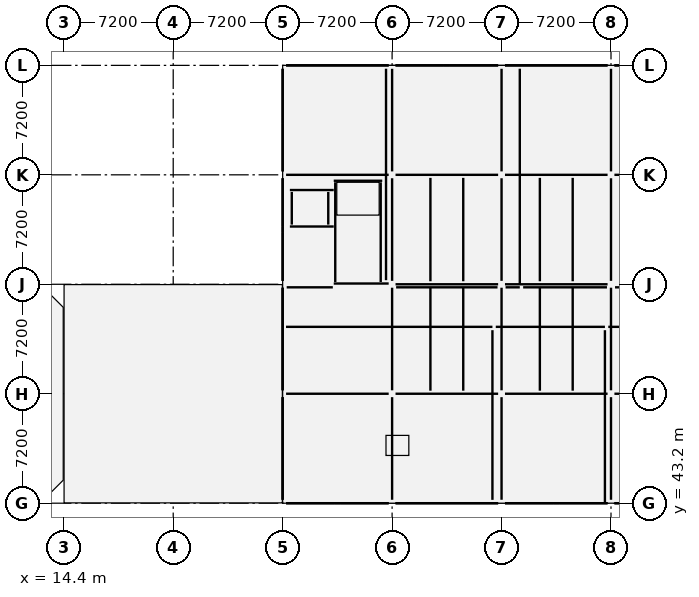
"""IFC4 building model, lengths in metres.
Left out: names, types, materials, properties, quantities, classifications, styles, units other than length and angle.
Written with IfcOpenShell. Run it as: python <this file> out.ifc"""

import sys

from ifc_helpers import new_model, si_unit, direction, frame, frame_2d, origin, origin_2d, place, context, subcontext, project, spatial, rectangle, extrude, element, fill, save


model = new_model("IFC4")
c1 = context("Model", 3, precision=1e-05, world=origin(), true_north=direction((0.0, 1.0)))
c2 = subcontext(c1, "Body", "Model", "MODEL_VIEW")
j1 = project(units=[si_unit("LENGTHUNIT", "METRE"), si_unit("PLANEANGLEUNIT", "RADIAN")], contexts=[c1])
p1 = place(None, origin())
s1 = spatial("IfcSite", under=j1, at=p1, CompositionType="ELEMENT")
p2 = place(p1, origin())
s2 = spatial("IfcBuilding", under=s1, at=p2, CompositionType="ELEMENT")
p3 = place(p2, frame((0.0, 0.0, 5.4)))
s3 = spatial("IfcBuildingStorey", under=s2, at=p3, CompositionType="ELEMENT", Elevation=5.4)
for number, where, z_axis, x_axis in (
    (1, (28.8, 43.2, 0.0), (0.0, 0.0, 1.0), (1.0, 0.0, 0.0)),
    (2, (28.8, 50.4, 0.0), (0.0, 0.0, 1.0), (1.0, 0.0, 0.0)),
    (3, (28.8, 57.6, 0.0), (0.0, 0.0, 1.0), (1.0, 0.0, 0.0)),
    (4, (28.8, 64.8, 0.0), (0.0, 0.0, 1.0), (1.0, 0.0, 0.0)),
    (5, (28.8, 72.0, 0.0), (0.0, 0.0, 1.0), (1.0, 0.0, 0.0)),
    (6, (36.0, 43.2, 0.0), (0.0, 0.0, 1.0), (1.0, 0.0, 0.0)),
    (7, (36.0, 50.4, 0.0), (0.0, 0.0, 1.0), (1.0, 0.0, 0.0)),
    (8, (36.0, 57.6, 0.0), (0.0, 0.0, 1.0), (1.0, 0.0, 0.0)),
    (9, (36.0, 64.8, 0.0), (0.0, 0.0, 1.0), (1.0, 0.0, 0.0)),
    (10, (36.0, 72.0, 0.0), (0.0, 0.0, 1.0), (1.0, 0.0, 0.0)),
    (11, (43.2, 43.2, 0.0), (0.0, 0.0, 1.0), (1.0, 0.0, 0.0)),
    (12, (43.2, 50.4, 0.0), (0.0, 0.0, 1.0), (1.0, 0.0, 0.0)),
    (13, (43.2, 57.6, 0.0), (0.0, 0.0, 1.0), (1.0, 0.0, 0.0)),
    (14, (43.2, 64.8, 0.0), (0.0, 0.0, 1.0), (1.0, 0.0, 0.0)),
    (15, (43.2, 72.0, 0.0), (0.0, 0.0, 1.0), (1.0, 0.0, 0.0)),
    (16, (50.4, 43.2, 0.0), (0.0, 0.0, 1.0), (1.0, 0.0, 0.0)),
    (17, (50.4, 50.4, 0.0), (0.0, 0.0, 1.0), (1.0, 0.0, 0.0)),
    (18, (50.4, 57.6, 0.0), (0.0, 0.0, 1.0), (1.0, 0.0, 0.0)),
    (19, (50.4, 64.8, 0.0), (0.0, 0.0, 1.0), (1.0, 0.0, 0.0)),
    (20, (50.4, 72.0, 0.0), (0.0, 0.0, 1.0), (1.0, 0.0, 0.0)),
):
    element("IfcColumn", number, at=place(p3, frame(where, z_axis=z_axis, x_axis=x_axis)), inside=s3, PredefinedType="COLUMN", context=c2, shape_type="SweptSolid", body=[
        extrude(rectangle(XDim=0.45, YDim=0.45, at=origin_2d()), origin(), (0.0, 0.0, 1.0), 4.2),
    ])
p4 = place(p3, frame((29.275, 61.4, 0.0), z_axis=(0.0, 0.0, 1.0), x_axis=(1.0, 0.0, 0.0)))
e21 = element("IfcWall", 21, at=p4, inside=s3, PredefinedType="SHEAR", context=c2, shape_type="SweptSolid", body=[
    extrude(rectangle(XDim=2.885, YDim=0.25, at=frame_2d((1.442, 0.0))), origin(), (0.0, 0.0, 1.0), 3.95),
])
p5 = place(p4, frame((0.942, 0.0, 0.0)))
e22 = element("IfcOpeningElement", 22, at=p5, cuts=e21, PredefinedType="OPENING", context=c2, shape_type="SweptSolid", body=[
    extrude(rectangle(XDim=1.0, YDim=2.1, at=frame_2d((0.5, 1.05))), frame((0.0, 0.137, 0.0), z_axis=(0.0, -1.0, 0.0), x_axis=(1.0, 0.0, 0.0)), (0.0, 0.0, 1.0), 0.274),
])
p6 = place(p3, frame((29.275, 63.8, 0.0), z_axis=(0.0, 0.0, 1.0), x_axis=(1.0, 0.0, 0.0)))
e23 = element("IfcWall", 23, at=p6, inside=s3, PredefinedType="SHEAR", context=c2, shape_type="SweptSolid", body=[
    extrude(rectangle(XDim=2.885, YDim=0.25, at=frame_2d((1.442, 0.0))), origin(), (0.0, 0.0, 1.0), 3.95),
])
for number, where, z_axis, x_axis in (
    (24, (29.4, 61.525, 0.0), (0.0, 0.0, 1.0), (0.0, 1.0, 0.0)),
    (25, (31.8, 61.525, 0.0), (0.0, 0.0, 1.0), (0.0, 1.0, 0.0)),
):
    element("IfcWall", number, at=place(p3, frame(where, z_axis=z_axis, x_axis=x_axis)), inside=s3, PredefinedType="SHEAR", context=c2, shape_type="SweptSolid", body=[
        extrude(rectangle(XDim=2.15, YDim=0.25, at=frame_2d((1.075, 0.0))), origin(), (0.0, 0.0, 1.0), 3.95),
    ])
p7 = place(p3, frame((32.16, 57.65, 0.0), z_axis=(0.0, 0.0, 1.0), x_axis=(1.0, 0.0, 0.0)))
e26 = element("IfcWall", 26, at=p7, inside=s3, PredefinedType="SHEAR", context=c2, shape_type="SweptSolid", body=[
    extrude(rectangle(XDim=3.615, YDim=0.2, at=frame_2d((1.808, 0.0))), origin(), (0.0, 0.0, 1.0), 3.95),
])
p8 = place(p7, frame((1.258, 0.0, 0.0)))
e27 = element("IfcOpeningElement", 27, at=p8, cuts=e26, PredefinedType="OPENING", context=c2, shape_type="SweptSolid", body=[
    extrude(rectangle(XDim=1.1, YDim=2.15, at=frame_2d((0.55, 1.075))), frame((0.0, 0.112, 0.0), z_axis=(0.0, -1.0, 0.0), x_axis=(1.0, 0.0, 0.0)), (0.0, 0.0, 1.0), 0.224),
])
p9 = place(p3, frame((32.16, 64.41, 0.0), z_axis=(0.0, 0.0, 1.0), x_axis=(1.0, 0.0, 0.0)))
e28 = element("IfcWall", 28, at=p9, inside=s3, PredefinedType="SHEAR", context=c2, shape_type="SweptSolid", body=[
    extrude(rectangle(XDim=3.19, YDim=0.2, at=frame_2d((1.595, 0.0))), origin(), (0.0, 0.0, 1.0), 3.95),
])
for number, where, z_axis, x_axis in (
    (29, (32.26, 57.75, 0.0), (0.0, 0.0, 1.0), (0.0, 1.0, 0.0)),
    (30, (35.25, 57.75, 0.0), (0.0, 0.0, 1.0), (0.0, 1.0, 0.0)),
):
    element("IfcWall", number, at=place(p3, frame(where, z_axis=z_axis, x_axis=x_axis)), inside=s3, PredefinedType="SHEAR", context=c2, shape_type="SweptSolid", body=[
        extrude(rectangle(XDim=6.56, YDim=0.2, at=frame_2d((3.28, 0.0))), origin(), (0.0, 0.0, 1.0), 3.95),
    ])
p10 = place(p3, frame((50.175, 72.0, 0.0), z_axis=(0.0, 0.0, 1.0), x_axis=(-1.0, 0.0, 0.0)))
e31 = element("IfcWall", 31, at=p10, inside=s3, PredefinedType="ELEMENTEDWALL", context=c2, shape_type="SweptSolid", body=[
    extrude(rectangle(XDim=6.75, YDim=0.32, at=frame_2d((3.375, 0.0))), origin(), (0.0, 0.0, 1.0), 3.29),
])
p11 = place(p10, frame((2.775, 0.0, 0.85)))
e32 = element("IfcOpeningElement", 32, at=p11, cuts=e31, PredefinedType="OPENING", context=c2, shape_type="SweptSolid", body=[
    extrude(rectangle(XDim=1.2, YDim=2.2, at=frame_2d((0.6, 1.1))), frame((0.0, 0.172, 0.0), z_axis=(0.0, -1.0, 0.0), x_axis=(1.0, 0.0, 0.0)), (0.0, 0.0, 1.0), 0.344),
])
p12 = place(p3, frame((39.8, 72.0, 0.0), z_axis=(0.0, 0.0, 1.0), x_axis=(-1.0, 0.0, 0.0)))
e33 = element("IfcWall", 33, at=p12, inside=s3, PredefinedType="SOLIDWALL", context=c2, shape_type="SweptSolid", body=[
    extrude(rectangle(XDim=0.4, YDim=0.36, at=frame_2d((0.2, 0.0))), origin(), (0.0, 0.0, 1.0), 3.29),
])
p13 = place(p3, frame((35.775, 72.0, 0.0), z_axis=(0.0, 0.0, 1.0), x_axis=(-1.0, 0.0, 0.0)))
e34 = element("IfcWall", 34, at=p13, inside=s3, PredefinedType="ELEMENTEDWALL", context=c2, shape_type="SweptSolid", body=[
    extrude(rectangle(XDim=6.75, YDim=0.32, at=frame_2d((3.375, 0.0))), origin(), (0.0, 0.0, 1.0), 3.29),
])
p14 = place(p13, frame((2.475, 0.0, 0.85)))
e35 = element("IfcOpeningElement", 35, at=p14, cuts=e34, PredefinedType="OPENING", context=c2, shape_type="SweptSolid", body=[
    extrude(rectangle(XDim=1.8, YDim=2.2, at=frame_2d((0.9, 1.1))), frame((0.0, 0.172, 0.0), z_axis=(0.0, -1.0, 0.0), x_axis=(1.0, 0.0, 0.0)), (0.0, 0.0, 1.0), 0.344),
])
p15 = place(p3, frame((28.8, 68.6, 0.0), z_axis=(0.0, 0.0, 1.0), x_axis=(0.0, -1.0, 0.0)))
e36 = element("IfcWall", 36, at=p15, inside=s3, PredefinedType="SOLIDWALL", context=c2, shape_type="SweptSolid", body=[
    extrude(rectangle(XDim=0.4, YDim=0.36, at=frame_2d((0.2, 0.0))), origin(), (0.0, 0.0, 1.0), 3.29),
])
p16 = place(p3, frame((28.8, 61.4, 0.0), z_axis=(0.0, 0.0, 1.0), x_axis=(0.0, -1.0, 0.0)))
e37 = element("IfcWall", 37, at=p16, inside=s3, PredefinedType="SOLIDWALL", context=c2, shape_type="SweptSolid", body=[
    extrude(rectangle(XDim=0.4, YDim=0.36, at=frame_2d((0.2, 0.0))), origin(), (0.0, 0.0, 1.0), 3.34),
])
p17 = place(p3, frame((28.8, 57.375, 0.0), z_axis=(0.0, 0.0, 1.0), x_axis=(0.0, -1.0, 0.0)))
e38 = element("IfcWall", 38, at=p17, inside=s3, PredefinedType="ELEMENTEDWALL", context=c2, shape_type="SweptSolid", body=[
    extrude(rectangle(XDim=6.75, YDim=0.32, at=frame_2d((3.375, 0.0))), origin(), (0.0, 0.0, 1.0), 3.29),
])
p18 = place(p17, frame((4.515, 0.0, 0.0)))
e39 = element("IfcOpeningElement", 39, at=p18, cuts=e38, PredefinedType="OPENING", context=c2, shape_type="SweptSolid", body=[
    extrude(rectangle(XDim=1.5, YDim=2.2, at=frame_2d((0.75, 1.1))), frame((0.0, 0.172, 0.0), z_axis=(0.0, -1.0, 0.0), x_axis=(1.0, 0.0, 0.0)), (0.0, 0.0, 1.0), 0.344),
])
p19 = place(p3, frame((28.8, 50.175, 0.0), z_axis=(0.0, 0.0, 1.0), x_axis=(0.0, -1.0, 0.0)))
e40 = element("IfcWall", 40, at=p19, inside=s3, PredefinedType="ELEMENTEDWALL", context=c2, shape_type="SweptSolid", body=[
    extrude(rectangle(XDim=6.75, YDim=0.32, at=frame_2d((3.375, 0.0))), origin(), (0.0, 0.0, 1.0), 3.34),
])
p20 = place(p19, frame((2.825, 0.0, 0.85)))
e41 = element("IfcOpeningElement", 41, at=p20, cuts=e40, PredefinedType="OPENING", context=c2, shape_type="SweptSolid", body=[
    extrude(rectangle(XDim=1.1, YDim=1.75, at=frame_2d((0.55, 0.875))), frame((0.0, 0.172, 0.0), z_axis=(0.0, -1.0, 0.0), x_axis=(1.0, 0.0, 0.0)), (0.0, 0.0, 1.0), 0.344),
])
p21 = place(p3, frame((32.2, 43.2, 0.0), z_axis=(0.0, 0.0, 1.0), x_axis=(1.0, 0.0, 0.0)))
e42 = element("IfcWall", 42, at=p21, inside=s3, PredefinedType="SOLIDWALL", context=c2, shape_type="SweptSolid", body=[
    extrude(rectangle(XDim=0.4, YDim=0.36, at=frame_2d((0.2, 0.0))), origin(), (0.0, 0.0, 1.0), 3.29),
])
p22 = place(p3, frame((36.225, 43.2, 0.0), z_axis=(0.0, 0.0, 1.0), x_axis=(1.0, 0.0, 0.0)))
e43 = element("IfcWall", 43, at=p22, inside=s3, PredefinedType="ELEMENTEDWALL", context=c2, shape_type="SweptSolid", body=[
    extrude(rectangle(XDim=6.75, YDim=0.32, at=frame_2d((3.375, 0.0))), origin(), (0.0, 0.0, 1.0), 3.29),
])
p23 = place(p22, frame((2.325, 0.0, 0.85)))
e44 = element("IfcOpeningElement", 44, at=p23, cuts=e43, PredefinedType="OPENING", context=c2, shape_type="SweptSolid", body=[
    extrude(rectangle(XDim=2.1, YDim=2.15, at=frame_2d((1.05, 1.075))), frame((0.0, 0.172, 0.0), z_axis=(0.0, -1.0, 0.0), x_axis=(1.0, 0.0, 0.0)), (0.0, 0.0, 1.0), 0.344),
])
p24 = place(p3, frame((46.6, 43.2, 0.0), z_axis=(0.0, 0.0, 1.0), x_axis=(1.0, 0.0, 0.0)))
e45 = element("IfcWall", 45, at=p24, inside=s3, PredefinedType="SOLIDWALL", context=c2, shape_type="SweptSolid", body=[
    extrude(rectangle(XDim=0.4, YDim=0.36, at=frame_2d((0.2, 0.0))), origin(), (0.0, 0.0, 1.0), 3.29),
])
p25 = place(p3, frame((50.625, 43.2, 0.0), z_axis=(0.0, 0.0, 1.0), x_axis=(1.0, 0.0, 0.0)))
e46 = element("IfcWall", 46, at=p25, inside=s3, PredefinedType="ELEMENTEDWALL", context=c2, shape_type="SweptSolid", body=[
    extrude(rectangle(XDim=5.85, YDim=0.32, at=frame_2d((2.925, 0.0))), origin(), (0.0, 0.0, 1.0), 3.29),
])
p26 = place(p25, frame((1.725, 0.0, 1.6)))
e47 = element("IfcOpeningElement", 47, at=p26, cuts=e46, PredefinedType="OPENING", context=c2, shape_type="SweptSolid", body=[
    extrude(rectangle(XDim=2.4, YDim=1.05, at=frame_2d((1.2, 0.525))), frame((0.0, 0.172, 0.0), z_axis=(0.0, -1.0, 0.0), x_axis=(1.0, 0.0, 0.0)), (0.0, 0.0, 1.0), 0.344),
])
p27 = place(p3, frame((29.065, 57.4, 0.0), z_axis=(0.0, 0.0, 1.0), x_axis=(1.0, 0.0, 0.0)))
e48 = element("IfcWall", 48, at=p27, inside=s3, PredefinedType="STANDARD", context=c2, shape_type="SweptSolid", body=[
    extrude(rectangle(XDim=3.035, YDim=0.22, at=frame_2d((1.518, 0.0))), origin(), (0.0, 0.0, 1.0), 3.92),
])
p28 = place(p27, frame((0.917, 0.0, 0.0)))
e49 = element("IfcOpeningElement", 49, at=p28, cuts=e48, PredefinedType="OPENING", context=c2, shape_type="SweptSolid", body=[
    extrude(rectangle(XDim=1.2, YDim=2.2, at=frame_2d((0.6, 1.1))), frame((0.0, 0.122, 0.0), z_axis=(0.0, -1.0, 0.0), x_axis=(1.0, 0.0, 0.0)), (0.0, 0.0, 1.0), 0.244),
])
p29 = place(p3, frame((29.02, 54.8, 0.0), z_axis=(0.0, 0.0, 1.0), x_axis=(1.0, 0.0, 0.0)))
e50 = element("IfcWall", 50, at=p29, inside=s3, PredefinedType="PARTITIONING", context=c2, shape_type="SweptSolid", body=[
    extrude(rectangle(XDim=13.58, YDim=0.12, at=frame_2d((6.79, 0.0))), origin(), (0.0, 0.0, 1.0), 3.288),
])
p30 = place(p29, frame((6.04, 0.0, 0.0)))
e51 = element("IfcOpeningElement", 51, at=p30, cuts=e50, PredefinedType="OPENING", context=c2, shape_type="SweptSolid", body=[
    extrude(rectangle(XDim=1.5, YDim=2.2, at=frame_2d((0.75, 1.1))), frame((0.0, 0.072, 0.0), z_axis=(0.0, -1.0, 0.0), x_axis=(1.0, 0.0, 0.0)), (0.0, 0.0, 1.0), 0.144),
])
p31 = place(p3, frame((42.6, 43.42, 0.0), z_axis=(0.0, 0.0, 1.0), x_axis=(0.0, 1.0, 0.0)))
e52 = element("IfcWall", 52, at=p31, inside=s3, PredefinedType="PARTITIONING", context=c2, shape_type="SweptSolid", body=[
    extrude(rectangle(XDim=11.16, YDim=0.12, at=frame_2d((5.58, 0.0))), origin(), (0.0, 0.0, 1.0), 3.188),
])
p32 = place(p3, frame((42.82, 54.8, 0.0), z_axis=(0.0, 0.0, 1.0), x_axis=(1.0, 0.0, 0.0)))
e53 = element("IfcWall", 53, at=p32, inside=s3, PredefinedType="PARTITIONING", context=c2, shape_type="SweptSolid", body=[
    extrude(rectangle(XDim=7.18, YDim=0.12, at=frame_2d((3.59, 0.0))), origin(), (0.0, 0.0, 1.0), 3.288),
])
p33 = place(p32, frame((3.09, 0.0, 0.0)))
e54 = element("IfcOpeningElement", 54, at=p33, cuts=e53, PredefinedType="OPENING", context=c2, shape_type="SweptSolid", body=[
    extrude(rectangle(XDim=1.0, YDim=2.15, at=frame_2d((0.5, 1.075))), frame((0.0, 0.072, 0.0), z_axis=(0.0, -1.0, 0.0), x_axis=(1.0, 0.0, 0.0)), (0.0, 0.0, 1.0), 0.144),
])
p34 = place(p3, frame((50.0, 43.2, 0.0), z_axis=(0.0, 0.0, 1.0), x_axis=(0.0, 1.0, 0.0)))
e55 = element("IfcWall", 55, at=p34, inside=s3, PredefinedType="PARTITIONING", context=c2, shape_type="SweptSolid", body=[
    extrude(rectangle(XDim=11.38, YDim=0.12, at=frame_2d((5.69, 0.0))), origin(), (0.0, 0.0, 1.0), 3.238),
])
p35 = place(p3, frame((50.22, 54.8, 0.0), z_axis=(0.0, 0.0, 1.0), x_axis=(1.0, 0.0, 0.0)))
e56 = element("IfcWall", 56, at=p35, inside=s3, PredefinedType="PLUMBINGWALL", context=c2, shape_type="SweptSolid", body=[
    extrude(rectangle(XDim=6.48, YDim=0.18, at=frame_2d((3.24, 0.0))), origin(), (0.0, 0.0, 1.0), 3.288),
])
p36 = place(p35, frame((2.79, 0.0, 0.0)))
e57 = element("IfcOpeningElement", 57, at=p36, cuts=e56, PredefinedType="OPENING", context=c2, shape_type="SweptSolid", body=[
    extrude(rectangle(XDim=0.9, YDim=2.1, at=frame_2d((0.45, 1.05))), frame((0.0, 0.102, 0.0), z_axis=(0.0, -1.0, 0.0), x_axis=(1.0, 0.0, 0.0)), (0.0, 0.0, 1.0), 0.204),
])
p37 = place(p3, frame((36.265, 57.4, 0.0), z_axis=(0.0, 0.0, 1.0), x_axis=(1.0, 0.0, 0.0)))
e58 = element("IfcWall", 58, at=p37, inside=s3, PredefinedType="STANDARD", context=c2, shape_type="SweptSolid", body=[
    extrude(rectangle(XDim=6.67, YDim=0.15, at=frame_2d((3.335, 0.0))), origin(), (0.0, 0.0, 1.0), 3.238),
])
p38 = place(p37, frame((2.81, 0.0, 0.0)))
e59 = element("IfcOpeningElement", 59, at=p38, cuts=e58, PredefinedType="OPENING", context=c2, shape_type="SweptSolid", body=[
    extrude(rectangle(XDim=1.05, YDim=2.15, at=frame_2d((0.525, 1.075))), frame((0.0, 0.087, 0.0), z_axis=(0.0, -1.0, 0.0), x_axis=(1.0, 0.0, 0.0)), (0.0, 0.0, 1.0), 0.174),
])
p39 = place(p3, frame((43.465, 57.4, 0.0), z_axis=(0.0, 0.0, 1.0), x_axis=(1.0, 0.0, 0.0)))
e60 = element("IfcWall", 60, at=p39, inside=s3, PredefinedType="STANDARD", context=c2, shape_type="SweptSolid", body=[
    extrude(rectangle(XDim=0.935, YDim=0.15, at=frame_2d((0.467, 0.0))), origin(), (0.0, 0.0, 1.0), 3.188),
])
p40 = place(p3, frame((44.4, 57.62, 0.0), z_axis=(0.0, 0.0, 1.0), x_axis=(0.0, 1.0, 0.0)))
e61 = element("IfcWall", 61, at=p40, inside=s3, PredefinedType="STANDARD", context=c2, shape_type="SweptSolid", body=[
    extrude(rectangle(XDim=14.16, YDim=0.15, at=frame_2d((7.08, 0.0))), origin(), (0.0, 0.0, 1.0), 3.188),
])
p41 = place(p3, frame((35.6, 57.87, 0.0), z_axis=(0.0, 0.0, 1.0), x_axis=(0.0, 1.0, 0.0)))
e62 = element("IfcWall", 62, at=p41, inside=s3, PredefinedType="STANDARD", context=c2, shape_type="SweptSolid", body=[
    extrude(rectangle(XDim=13.91, YDim=0.15, at=frame_2d((6.955, 0.0))), origin(), (0.0, 0.0, 1.0), 3.238),
])
p42 = place(p3, frame((44.62, 57.4, 0.0), z_axis=(0.0, 0.0, 1.0), x_axis=(1.0, 0.0, 0.0)))
e63 = element("IfcWall", 63, at=p42, inside=s3, PredefinedType="PARTITIONING", context=c2, shape_type="SweptSolid", body=[
    extrude(rectangle(XDim=5.515, YDim=0.1, at=frame_2d((2.757, 0.0))), origin(), (0.0, 0.0, 1.0), 3.188),
])
p43 = place(p42, frame((2.232, 0.0, 0.0)))
e64 = element("IfcOpeningElement", 64, at=p43, cuts=e63, PredefinedType="OPENING", context=c2, shape_type="SweptSolid", body=[
    extrude(rectangle(XDim=1.05, YDim=2.15, at=frame_2d((0.525, 1.075))), frame((0.0, 0.062, 0.0), z_axis=(0.0, -1.0, 0.0), x_axis=(1.0, 0.0, 0.0)), (0.0, 0.0, 1.0), 0.124),
])
p44 = place(p3, frame((50.665, 57.4, 0.0), z_axis=(0.0, 0.0, 1.0), x_axis=(1.0, 0.0, 0.0)))
e65 = element("IfcWall", 65, at=p44, inside=s3, PredefinedType="PARTITIONING", context=c2, shape_type="SweptSolid", body=[
    extrude(rectangle(XDim=2.135, YDim=0.1, at=frame_2d((1.067, 0.0))), origin(), (0.0, 0.0, 1.0), 3.92),
])
p45 = place(p11, origin())
e66 = element("IfcWindow", 66, at=p45, inside=s3, PartitioningType="SINGLE_PANEL", PredefinedType="WINDOW", context=c2, shape_type="SweptSolid", body=[
    extrude(rectangle(XDim=1.2, YDim=2.2, at=frame_2d((0.6, 1.1))), frame((0.0, 0.03, 0.0), z_axis=(0.0, -1.0, 0.0), x_axis=(1.0, 0.0, 0.0)), (0.0, 0.0, 1.0), 0.06),
])
fill(e32, e66)
p46 = place(p14, origin())
e67 = element("IfcWindow", 67, at=p46, inside=s3, PartitioningType="SINGLE_PANEL", PredefinedType="WINDOW", context=c2, shape_type="SweptSolid", body=[
    extrude(rectangle(XDim=1.8, YDim=2.2, at=frame_2d((0.9, 1.1))), frame((0.0, 0.03, 0.0), z_axis=(0.0, -1.0, 0.0), x_axis=(1.0, 0.0, 0.0)), (0.0, 0.0, 1.0), 0.06),
])
fill(e35, e67)
p47 = place(p18, frame((1.5, 0.0, 0.0), z_axis=(0.0, 0.0, 1.0), x_axis=(-1.0, 0.0, 0.0)))
e68 = element("IfcDoor", 68, at=p47, inside=s3, OperationType="DOUBLE_SWING_LEFT", PredefinedType="DOOR", context=c2, shape_type="SweptSolid", body=[
    extrude(rectangle(XDim=1.5, YDim=2.2, at=frame_2d((0.75, 1.1))), frame((0.0, 0.025, 0.0), z_axis=(0.0, -1.0, 0.0), x_axis=(1.0, 0.0, 0.0)), (0.0, 0.0, 1.0), 0.05),
])
fill(e39, e68)
p48 = place(p20, origin())
e69 = element("IfcWindow", 69, at=p48, inside=s3, PartitioningType="SINGLE_PANEL", PredefinedType="WINDOW", context=c2, shape_type="SweptSolid", body=[
    extrude(rectangle(XDim=1.1, YDim=1.75, at=frame_2d((0.55, 0.875))), frame((0.0, 0.03, 0.0), z_axis=(0.0, -1.0, 0.0), x_axis=(1.0, 0.0, 0.0)), (0.0, 0.0, 1.0), 0.06),
])
fill(e41, e69)
p49 = place(p23, origin())
e70 = element("IfcWindow", 70, at=p49, inside=s3, PartitioningType="SINGLE_PANEL", PredefinedType="WINDOW", context=c2, shape_type="SweptSolid", body=[
    extrude(rectangle(XDim=2.1, YDim=2.15, at=frame_2d((1.05, 1.075))), frame((0.0, 0.03, 0.0), z_axis=(0.0, -1.0, 0.0), x_axis=(1.0, 0.0, 0.0)), (0.0, 0.0, 1.0), 0.06),
])
fill(e44, e70)
p50 = place(p8, origin())
e71 = element("IfcDoor", 71, at=p50, inside=s3, OperationType="SINGLE_SWING_RIGHT", PredefinedType="DOOR", context=c2, shape_type="SweptSolid", body=[
    extrude(rectangle(XDim=1.1, YDim=2.15, at=frame_2d((0.55, 1.075))), frame((0.0, 0.025, 0.0), z_axis=(0.0, -1.0, 0.0), x_axis=(1.0, 0.0, 0.0)), (0.0, 0.0, 1.0), 0.05),
])
fill(e27, e71)
p51 = place(p5, origin())
e72 = element("IfcDoor", 72, at=p51, inside=s3, OperationType="SLIDING_TO_RIGHT", PredefinedType="DOOR", context=c2, shape_type="SweptSolid", body=[
    extrude(rectangle(XDim=1.0, YDim=2.1, at=frame_2d((0.5, 1.05))), frame((0.0, 0.025, 0.0), z_axis=(0.0, -1.0, 0.0), x_axis=(1.0, 0.0, 0.0)), (0.0, 0.0, 1.0), 0.05),
])
fill(e22, e72)
p52 = place(p28, origin())
e73 = element("IfcDoor", 73, at=p52, inside=s3, OperationType="SINGLE_SWING_RIGHT", PredefinedType="DOOR", context=c2, shape_type="SweptSolid", body=[
    extrude(rectangle(XDim=1.2, YDim=2.2, at=frame_2d((0.6, 1.1))), frame((0.0, 0.025, 0.0), z_axis=(0.0, -1.0, 0.0), x_axis=(1.0, 0.0, 0.0)), (0.0, 0.0, 1.0), 0.05),
])
fill(e49, e73)
p53 = place(p30, origin())
e74 = element("IfcDoor", 74, at=p53, inside=s3, OperationType="DOUBLE_SWING_LEFT", PredefinedType="DOOR", context=c2, shape_type="SweptSolid", body=[
    extrude(rectangle(XDim=1.5, YDim=2.2, at=frame_2d((0.75, 1.1))), frame((0.0, 0.025, 0.0), z_axis=(0.0, -1.0, 0.0), x_axis=(1.0, 0.0, 0.0)), (0.0, 0.0, 1.0), 0.05),
])
fill(e51, e74)
p54 = place(p33, origin())
e75 = element("IfcDoor", 75, at=p54, inside=s3, OperationType="SINGLE_SWING_LEFT", PredefinedType="DOOR", context=c2, shape_type="SweptSolid", body=[
    extrude(rectangle(XDim=1.0, YDim=2.15, at=frame_2d((0.5, 1.075))), frame((0.0, 0.025, 0.0), z_axis=(0.0, -1.0, 0.0), x_axis=(1.0, 0.0, 0.0)), (0.0, 0.0, 1.0), 0.05),
])
fill(e54, e75)
p55 = place(p38, origin())
e76 = element("IfcDoor", 76, at=p55, inside=s3, OperationType="SINGLE_SWING_LEFT", PredefinedType="DOOR", context=c2, shape_type="SweptSolid", body=[
    extrude(rectangle(XDim=1.05, YDim=2.15, at=frame_2d((0.525, 1.075))), frame((0.0, 0.025, 0.0), z_axis=(0.0, -1.0, 0.0), x_axis=(1.0, 0.0, 0.0)), (0.0, 0.0, 1.0), 0.05),
])
fill(e59, e76)
p56 = place(p43, origin())
e77 = element("IfcDoor", 77, at=p56, inside=s3, OperationType="SINGLE_SWING_RIGHT", PredefinedType="DOOR", context=c2, shape_type="SweptSolid", body=[
    extrude(rectangle(XDim=1.05, YDim=2.15, at=frame_2d((0.525, 1.075))), frame((0.0, 0.025, 0.0), z_axis=(0.0, -1.0, 0.0), x_axis=(1.0, 0.0, 0.0)), (0.0, 0.0, 1.0), 0.05),
])
fill(e64, e77)
save(model, sys.argv[1])
